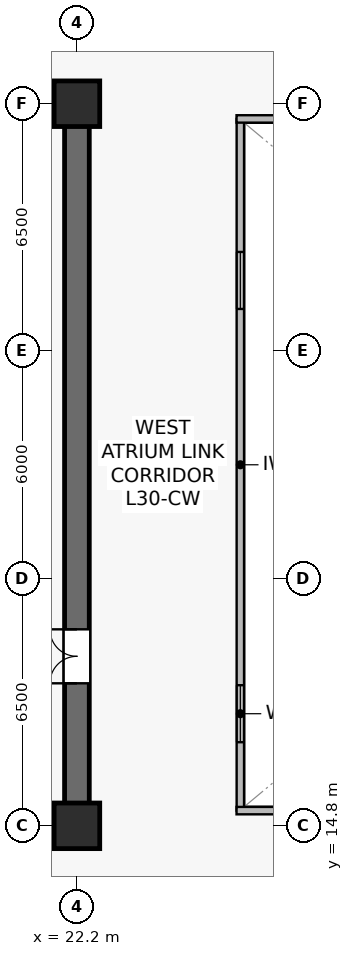
"""IFC4 building model, lengths in metres.
Left out: names, types, materials, properties, quantities, classifications, styles, units other than length and angle.
Written with IfcOpenShell. Run it as: python <this file> out.ifc"""

import sys

from ifc_helpers import new_model, si_unit, direction, frame, frame_2d, origin, origin_2d, place, context, subcontext, project, spatial, rectangle, extrude, source, transform, mapped, element, fill, save


model = new_model("IFC4")
c1 = context("Model", 3, precision=1e-05, world=origin(), true_north=direction((0.0, 1.0)))
c2 = subcontext(c1, "Body", "Model", "MODEL_VIEW")
j1 = project(units=[si_unit("LENGTHUNIT", "METRE"), si_unit("PLANEANGLEUNIT", "RADIAN")], contexts=[c1])
p1 = place(None, origin())
s1 = spatial("IfcSite", under=j1, at=p1, CompositionType="ELEMENT")
p2 = place(p1, origin())
s2 = spatial("IfcBuilding", under=s1, at=p2, CompositionType="ELEMENT")
p3 = place(p2, frame((0.0, 0.0, 125.6)))
s3 = spatial("IfcBuildingStorey", under=s2, at=p3, CompositionType="ELEMENT", Elevation=125.6)
p4 = place(p3, frame((7.075, 14.8, 0.0), z_axis=(0.0, 0.0, 1.0), x_axis=(1.0, 0.0, 0.0)))
e1 = element("IfcWall", 1, at=p4, inside=s3, PredefinedType="SHEAR", context=c2, shape_type="SweptSolid", body=[
    extrude(rectangle(XDim=15.45, YDim=0.65, at=frame_2d((7.725, 0.0))), origin(), (0.0, 0.0, 1.0), 3.79),
])
p5 = place(p3, frame((7.075, 33.8, 0.0), z_axis=(0.0, 0.0, 1.0), x_axis=(1.0, 0.0, 0.0)))
e2 = element("IfcWall", 2, at=p5, inside=s3, PredefinedType="SHEAR", context=c2, shape_type="SweptSolid", body=[
    extrude(rectangle(XDim=15.45, YDim=0.65, at=frame_2d((7.725, 0.0))), origin(), (0.0, 0.0, 1.0), 3.79),
])
p6 = place(p5, frame((8.375, 0.0, 0.0)))
e3 = element("IfcOpeningElement", 3, at=p6, cuts=e2, PredefinedType="OPENING", context=c2, shape_type="SweptSolid", body=[
    extrude(rectangle(XDim=0.95, YDim=2.15, at=frame_2d((0.475, 1.075))), frame((0.0, 0.335, 0.0), z_axis=(0.0, -1.0, 0.0), x_axis=(1.0, 0.0, 0.0)), (0.0, 0.0, 1.0), 0.67),
])
p7 = place(p5, frame((11.915, 0.0, 0.0)))
e4 = element("IfcOpeningElement", 4, at=p7, cuts=e2, PredefinedType="OPENING", context=c2, shape_type="SweptSolid", body=[
    extrude(rectangle(XDim=0.95, YDim=2.15, at=frame_2d((0.475, 1.075))), frame((0.0, 0.335, 0.0), z_axis=(0.0, -1.0, 0.0), x_axis=(1.0, 0.0, 0.0)), (0.0, 0.0, 1.0), 0.67),
])
p8 = place(p3, frame((22.2, 15.125, 0.0), z_axis=(0.0, 0.0, 1.0), x_axis=(0.0, 1.0, 0.0)))
e5 = element("IfcWall", 5, at=p8, inside=s3, PredefinedType="SHEAR", context=c2, shape_type="SweptSolid", body=[
    extrude(rectangle(XDim=18.35, YDim=0.65, at=frame_2d((9.175, 0.0))), origin(), (0.0, 0.0, 1.0), 3.79),
])
p9 = place(p8, frame((3.425, 0.0, 0.0)))
e6 = element("IfcOpeningElement", 6, at=p9, cuts=e5, PredefinedType="OPENING", context=c2, shape_type="SweptSolid", body=[
    extrude(rectangle(XDim=1.42, YDim=2.2, at=frame_2d((0.71, 1.1))), frame((0.0, 0.335, 0.0), z_axis=(0.0, -1.0, 0.0), x_axis=(1.0, 0.0, 0.0)), (0.0, 0.0, 1.0), 0.67),
])
m1 = source(origin(), c2, "Body", "SweptSolid", [
    extrude(rectangle(XDim=1.2, YDim=1.2, at=origin_2d()), origin(), (0.0, 0.0, 1.0), 4.1),
])
for number, where, z_axis, x_axis in (
    (7, (22.2, 14.8, 0.0), (0.0, 0.0, 1.0), (1.0, 0.0, 0.0)),
    (8, (22.2, 33.8, 0.0), (0.0, 0.0, 1.0), (1.0, 0.0, 0.0)),
):
    element("IfcColumn", number, at=place(p3, frame(where, z_axis=z_axis, x_axis=x_axis)), inside=s3, PredefinedType="COLUMN", context=c2, shape_type="MappedRepresentation", body=[
        mapped(m1, transform((0.0, 0.0, 0.0), scale=1.0)),
    ])
p10 = place(p3, frame((26.5, 15.2, 0.0), z_axis=(0.0, 0.0, 1.0), x_axis=(0.0, 1.0, 0.0)))
e9 = element("IfcWall", 9, at=p10, inside=s3, PredefinedType="SOLIDWALL", context=c2, shape_type="SweptSolid", body=[
    extrude(rectangle(XDim=18.2, YDim=0.195, at=frame_2d((9.1, 0.0))), origin(), (0.0, 0.0, 1.0), 3.79),
])
p11 = place(p10, frame((1.8, 0.0, 0.9)))
e10 = element("IfcOpeningElement", 10, at=p11, cuts=e9, PredefinedType="OPENING", context=c2, shape_type="SweptSolid", body=[
    extrude(rectangle(XDim=1.5, YDim=1.4, at=frame_2d((0.75, 0.7))), frame((0.0, 0.107, 0.0), z_axis=(0.0, -1.0, 0.0), x_axis=(1.0, 0.0, 0.0)), (0.0, 0.0, 1.0), 0.215),
])
p12 = place(p10, frame((13.2, 0.0, 0.9)))
e11 = element("IfcOpeningElement", 11, at=p12, cuts=e9, PredefinedType="OPENING", context=c2, shape_type="SweptSolid", body=[
    extrude(rectangle(XDim=1.5, YDim=1.4, at=frame_2d((0.75, 0.7))), frame((0.0, 0.107, 0.0), z_axis=(0.0, -1.0, 0.0), x_axis=(1.0, 0.0, 0.0)), (0.0, 0.0, 1.0), 0.215),
])
for number, where, z_axis, x_axis in (
    (12, (26.4, 15.2, 0.0), (0.0, 0.0, 1.0), (1.0, 0.0, 0.0)),
    (13, (26.4, 33.4, 0.0), (0.0, 0.0, 1.0), (1.0, 0.0, 0.0)),
):
    element("IfcWall", number, at=place(p3, frame(where, z_axis=z_axis, x_axis=x_axis)), inside=s3, PredefinedType="SOLIDWALL", context=c2, shape_type="SweptSolid", body=[
        extrude(rectangle(XDim=22.0, YDim=0.195, at=frame_2d((11.0, 0.0))), origin(), (0.0, 0.0, 1.0), 3.79),
    ])
m2 = source(origin(), c2, "Body", "SweptSolid", [
    extrude(rectangle(XDim=1.5, YDim=1.4, at=frame_2d((0.75, 0.7))), frame((0.0, 0.03, 0.0), z_axis=(0.0, -1.0, 0.0), x_axis=(1.0, 0.0, 0.0)), (0.0, 0.0, 1.0), 0.06),
])
p13 = place(p11, origin())
e14 = element("IfcWindow", 14, at=p13, inside=s3, PartitioningType="SINGLE_PANEL", PredefinedType="WINDOW", context=c2, shape_type="MappedRepresentation", body=[
    mapped(m2, transform((0.0, 0.0, 0.0), scale=1.0)),
])
fill(e10, e14)
p14 = place(p12, origin())
e15 = element("IfcWindow", 15, at=p14, inside=s3, PartitioningType="SINGLE_PANEL", PredefinedType="WINDOW", context=c2, shape_type="MappedRepresentation", body=[
    mapped(m2, transform((0.0, 0.0, 0.0), scale=1.0)),
])
fill(e11, e15)
m3 = source(origin(), c2, "Body", "SweptSolid", [
    extrude(rectangle(XDim=1.42, YDim=2.2, at=frame_2d((0.71, 1.1))), frame((0.0, 0.025, 0.0), z_axis=(0.0, -1.0, 0.0), x_axis=(1.0, 0.0, 0.0)), (0.0, 0.0, 1.0), 0.05),
])
p15 = place(p9, origin())
e16 = element("IfcDoor", 16, at=p15, inside=s3, OperationType="DOUBLE_DOOR_SINGLE_SWING", PredefinedType="DOOR", context=c2, shape_type="MappedRepresentation", body=[
    mapped(m3, transform((0.0, 0.0, 0.0), scale=1.0)),
])
fill(e6, e16)
save(model, sys.argv[1])
